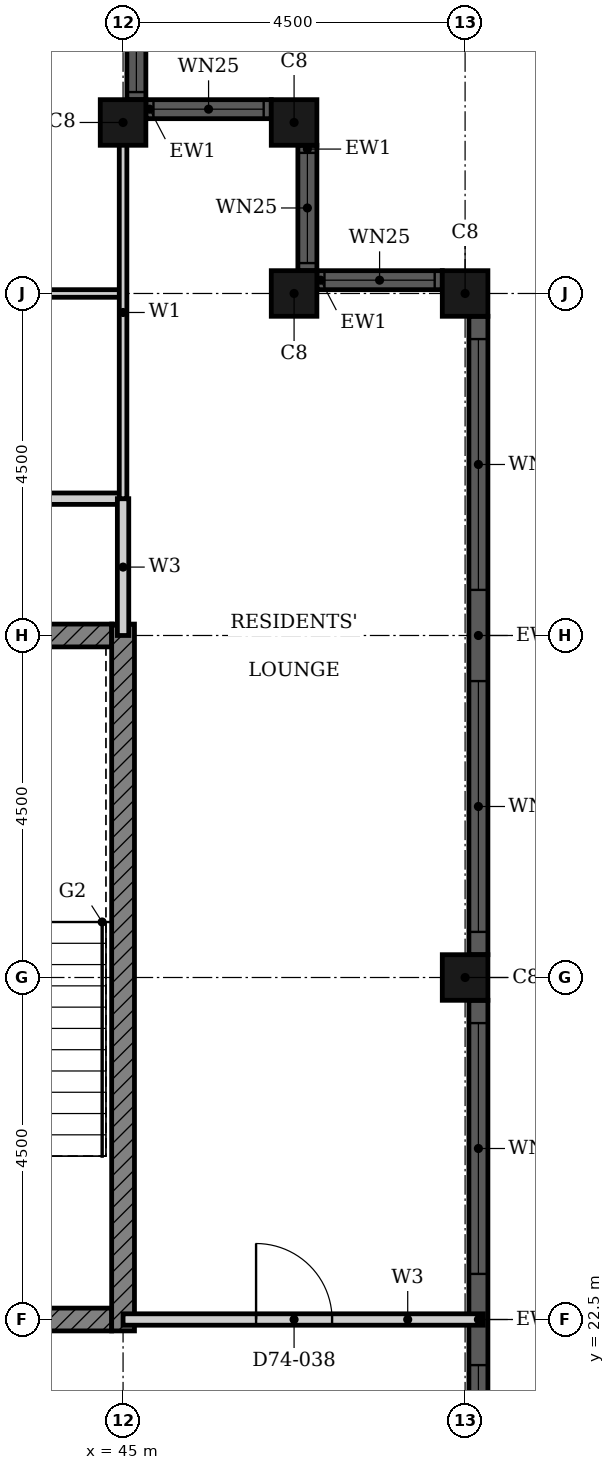
"""IFC4 building model, lengths in metres.
Left out: names, types, materials, properties, quantities, classifications, styles, units other than length and angle.
Written with IfcOpenShell. Run it as: python <this file> out.ifc"""

import sys

from ifc_helpers import new_model, si_unit, direction, frame, frame_2d, origin, origin_2d, place, context, subcontext, project, spatial, rectangle, hollow_rectangle, extrude, element, fill, save


model = new_model("IFC4")
c1 = context("Model", 3, precision=1e-05, world=origin(), true_north=direction((0.0, 1.0)))
c2 = subcontext(c1, "Body", "Model", "MODEL_VIEW")
j1 = project(units=[si_unit("LENGTHUNIT", "METRE"), si_unit("PLANEANGLEUNIT", "RADIAN")], contexts=[c1])
p1 = place(None, origin())
s1 = spatial("IfcSite", under=j1, at=p1, CompositionType="ELEMENT")
p2 = place(p1, origin())
s2 = spatial("IfcBuilding", under=s1, at=p2, CompositionType="ELEMENT")
p3 = place(p2, frame((0.0, 0.0, 290.8)))
s3 = spatial("IfcBuildingStorey", under=s2, at=p3, CompositionType="ELEMENT", Elevation=290.8)
for number, where, z_axis, x_axis in (
    (1, (49.5, 27.0, 0.0), (0.0, 0.0, 1.0), (1.0, 0.0, 0.0)),
    (2, (49.5, 36.0, 0.0), (0.0, 0.0, 1.0), (1.0, 0.0, 0.0)),
    (3, (47.25, 36.0, 0.0), (0.0, 0.0, 1.0), (1.0, 0.0, 0.0)),
    (4, (47.25, 38.25, 0.0), (0.0, 0.0, 1.0), (1.0, 0.0, 0.0)),
    (5, (45.0, 38.25, 0.0), (0.0, 0.0, 1.0), (1.0, 0.0, 0.0)),
):
    element("IfcColumn", number, at=place(p3, frame(where, z_axis=z_axis, x_axis=x_axis)), inside=s3, PredefinedType="COLUMN", context=c2, shape_type="SweptSolid", body=[
        extrude(hollow_rectangle(XDim=0.6, YDim=0.6, WallThickness=0.02, at=origin_2d()), origin(), (0.0, 0.0, 1.0), 3.7),
    ])
p4 = place(p3, frame((49.675, 18.3, 0.0), z_axis=(0.0, 0.0, 1.0), x_axis=(0.0, 1.0, 0.0)))
e6 = element("IfcWall", 6, at=p4, inside=s3, PredefinedType="SOLIDWALL", context=c2, shape_type="SweptSolid", body=[
    extrude(rectangle(XDim=8.4, YDim=0.25, at=frame_2d((4.2, 0.0))), origin(), (0.0, 0.0, 1.0), 3.7),
])
p5 = place(p4, frame((0.3, 0.0, 0.45)))
e7 = element("IfcOpeningElement", 7, at=p5, cuts=e6, PredefinedType="OPENING", context=c2, shape_type="SweptSolid", body=[
    extrude(rectangle(XDim=3.3, YDim=2.3, at=frame_2d((1.65, 1.15))), frame((0.0, 0.135, 0.0), z_axis=(0.0, -1.0, 0.0), x_axis=(1.0, 0.0, 0.0)), (0.0, 0.0, 1.0), 0.27),
])
p6 = place(p4, frame((4.8, 0.0, 0.45)))
e8 = element("IfcOpeningElement", 8, at=p6, cuts=e6, PredefinedType="OPENING", context=c2, shape_type="SweptSolid", body=[
    extrude(rectangle(XDim=3.3, YDim=2.3, at=frame_2d((1.65, 1.15))), frame((0.0, 0.135, 0.0), z_axis=(0.0, -1.0, 0.0), x_axis=(1.0, 0.0, 0.0)), (0.0, 0.0, 1.0), 0.27),
])
p7 = place(p3, frame((49.675, 27.3, 0.0), z_axis=(0.0, 0.0, 1.0), x_axis=(0.0, 1.0, 0.0)))
e9 = element("IfcWall", 9, at=p7, inside=s3, PredefinedType="SOLIDWALL", context=c2, shape_type="SweptSolid", body=[
    extrude(rectangle(XDim=8.4, YDim=0.25, at=frame_2d((4.2, 0.0))), origin(), (0.0, 0.0, 1.0), 3.7),
])
p8 = place(p7, frame((0.3, 0.0, 0.45)))
e10 = element("IfcOpeningElement", 10, at=p8, cuts=e9, PredefinedType="OPENING", context=c2, shape_type="SweptSolid", body=[
    extrude(rectangle(XDim=3.3, YDim=2.3, at=frame_2d((1.65, 1.15))), frame((0.0, 0.135, 0.0), z_axis=(0.0, -1.0, 0.0), x_axis=(1.0, 0.0, 0.0)), (0.0, 0.0, 1.0), 0.27),
])
p9 = place(p7, frame((4.8, 0.0, 0.45)))
e11 = element("IfcOpeningElement", 11, at=p9, cuts=e9, PredefinedType="OPENING", context=c2, shape_type="SweptSolid", body=[
    extrude(rectangle(XDim=3.3, YDim=2.3, at=frame_2d((1.65, 1.15))), frame((0.0, 0.135, 0.0), z_axis=(0.0, -1.0, 0.0), x_axis=(1.0, 0.0, 0.0)), (0.0, 0.0, 1.0), 0.27),
])
p10 = place(p3, frame((49.2, 36.175, 0.0), z_axis=(0.0, 0.0, 1.0), x_axis=(-1.0, 0.0, 0.0)))
e12 = element("IfcWall", 12, at=p10, inside=s3, PredefinedType="SOLIDWALL", context=c2, shape_type="SweptSolid", body=[
    extrude(rectangle(XDim=1.65, YDim=0.25, at=frame_2d((0.825, 0.0))), origin(), (0.0, 0.0, 1.0), 3.7),
])
p11 = place(p10, frame((0.1, 0.0, 0.9)))
e13 = element("IfcOpeningElement", 13, at=p11, cuts=e12, PredefinedType="OPENING", context=c2, shape_type="SweptSolid", body=[
    extrude(rectangle(XDim=1.45, YDim=1.85, at=frame_2d((0.725, 0.925))), frame((0.0, 0.135, 0.0), z_axis=(0.0, -1.0, 0.0), x_axis=(1.0, 0.0, 0.0)), (0.0, 0.0, 1.0), 0.27),
])
p12 = place(p3, frame((47.425, 36.3, 0.0), z_axis=(0.0, 0.0, 1.0), x_axis=(0.0, 1.0, 0.0)))
e14 = element("IfcWall", 14, at=p12, inside=s3, PredefinedType="SOLIDWALL", context=c2, shape_type="SweptSolid", body=[
    extrude(rectangle(XDim=1.65, YDim=0.25, at=frame_2d((0.825, 0.0))), origin(), (0.0, 0.0, 1.0), 3.7),
])
p13 = place(p12, frame((0.1, 0.0, 0.9)))
e15 = element("IfcOpeningElement", 15, at=p13, cuts=e14, PredefinedType="OPENING", context=c2, shape_type="SweptSolid", body=[
    extrude(rectangle(XDim=1.45, YDim=1.85, at=frame_2d((0.725, 0.925))), frame((0.0, 0.135, 0.0), z_axis=(0.0, -1.0, 0.0), x_axis=(1.0, 0.0, 0.0)), (0.0, 0.0, 1.0), 0.27),
])
p14 = place(p3, frame((46.95, 38.425, 0.0), z_axis=(0.0, 0.0, 1.0), x_axis=(-1.0, 0.0, 0.0)))
e16 = element("IfcWall", 16, at=p14, inside=s3, PredefinedType="SOLIDWALL", context=c2, shape_type="SweptSolid", body=[
    extrude(rectangle(XDim=1.65, YDim=0.25, at=frame_2d((0.825, 0.0))), origin(), (0.0, 0.0, 1.0), 3.7),
])
p15 = place(p14, frame((0.1, 0.0, 0.9)))
e17 = element("IfcOpeningElement", 17, at=p15, cuts=e16, PredefinedType="OPENING", context=c2, shape_type="SweptSolid", body=[
    extrude(rectangle(XDim=1.45, YDim=1.85, at=frame_2d((0.725, 0.925))), frame((0.0, 0.135, 0.0), z_axis=(0.0, -1.0, 0.0), x_axis=(1.0, 0.0, 0.0)), (0.0, 0.0, 1.0), 0.27),
])
p16 = place(p3, frame((45.175, 38.55, 0.0), z_axis=(0.0, 0.0, 1.0), x_axis=(0.0, 1.0, 0.0)))
e18 = element("IfcWall", 18, at=p16, inside=s3, PredefinedType="SOLIDWALL", context=c2, shape_type="SweptSolid", body=[
    extrude(rectangle(XDim=1.65, YDim=0.25, at=frame_2d((0.825, 0.0))), origin(), (0.0, 0.0, 1.0), 3.7),
])
p17 = place(p16, frame((0.1, 0.0, 0.9)))
e19 = element("IfcOpeningElement", 19, at=p17, cuts=e18, PredefinedType="OPENING", context=c2, shape_type="SweptSolid", body=[
    extrude(rectangle(XDim=1.45, YDim=1.85, at=frame_2d((0.725, 0.925))), frame((0.0, 0.135, 0.0), z_axis=(0.0, -1.0, 0.0), x_axis=(1.0, 0.0, 0.0)), (0.0, 0.0, 1.0), 0.27),
])
p18 = place(p3, frame((30.339, 22.5, 0.0), z_axis=(0.0, 0.0, 1.0), x_axis=(1.0, 0.0, 0.0)))
e20 = element("IfcWall", 20, at=p18, inside=s3, PredefinedType="SHEAR", context=c2, shape_type="SweptSolid", body=[
    extrude(rectangle(XDim=14.511, YDim=0.3, at=frame_2d((7.255, 0.0))), origin(), (0.0, 0.0, 1.0), 3.4),
])
p19 = place(p18, frame((7.975, 0.0, 0.0)))
e21 = element("IfcOpeningElement", 21, at=p19, cuts=e20, PredefinedType="OPENING", context=c2, shape_type="SweptSolid", body=[
    extrude(rectangle(XDim=1.8, YDim=2.1, at=frame_2d((0.9, 1.05))), frame((0.0, 0.16, 0.0), z_axis=(0.0, -1.0, 0.0), x_axis=(1.0, 0.0, 0.0)), (0.0, 0.0, 1.0), 0.32),
])
p20 = place(p3, frame((40.625, 31.5, 0.0), z_axis=(0.0, 0.0, 1.0), x_axis=(1.0, 0.0, 0.0)))
e22 = element("IfcWall", 22, at=p20, inside=s3, PredefinedType="SHEAR", context=c2, shape_type="SweptSolid", body=[
    extrude(rectangle(XDim=4.225, YDim=0.3, at=frame_2d((2.113, 0.0))), origin(), (0.0, 0.0, 1.0), 3.4),
])
p21 = place(p3, frame((45.0, 22.35, 0.0), z_axis=(0.0, 0.0, 1.0), x_axis=(0.0, 1.0, 0.0)))
e23 = element("IfcWall", 23, at=p21, inside=s3, PredefinedType="SHEAR", context=c2, shape_type="SweptSolid", body=[
    extrude(rectangle(XDim=9.3, YDim=0.3, at=frame_2d((4.65, 0.0))), origin(), (0.0, 0.0, 1.0), 3.4),
])
p22 = place(p3, frame((45.0, 22.5, 0.0), z_axis=(0.0, 0.0, 1.0), x_axis=(1.0, 0.0, 0.0)))
e24 = element("IfcWall", 24, at=p22, inside=s3, PredefinedType="PARTITIONING", context=c2, shape_type="SweptSolid", body=[
    extrude(rectangle(XDim=4.74, YDim=0.15, at=frame_2d((2.37, 0.0))), origin(), (0.0, 0.0, 1.0), 3.4),
])
p23 = place(p22, frame((1.75, 0.0, 0.0)))
e25 = element("IfcOpeningElement", 25, at=p23, cuts=e24, PredefinedType="OPENING", context=c2, shape_type="SweptSolid", body=[
    extrude(rectangle(XDim=1.0, YDim=2.1, at=frame_2d((0.5, 1.05))), frame((0.0, 0.085, 0.0), z_axis=(0.0, -1.0, 0.0), x_axis=(1.0, 0.0, 0.0)), (0.0, 0.0, 1.0), 0.17),
])
p24 = place(p3, frame((33.9, 33.3, 0.0), z_axis=(0.0, 0.0, 1.0), x_axis=(1.0, 0.0, 0.0)))
e26 = element("IfcWall", 26, at=p24, inside=s3, PredefinedType="PARTITIONING", context=c2, shape_type="SweptSolid", body=[
    extrude(rectangle(XDim=11.1, YDim=0.15, at=frame_2d((5.55, 0.0))), origin(), (0.0, 0.0, 1.0), 3.4),
])
p25 = place(p24, frame((1.6, 0.0, 0.0)))
e27 = element("IfcOpeningElement", 27, at=p25, cuts=e26, PredefinedType="OPENING", context=c2, shape_type="SweptSolid", body=[
    extrude(rectangle(XDim=1.0, YDim=2.2, at=frame_2d((0.5, 1.1))), frame((0.0, 0.085, 0.0), z_axis=(0.0, -1.0, 0.0), x_axis=(1.0, 0.0, 0.0)), (0.0, 0.0, 1.0), 0.17),
])
p26 = place(p3, frame((45.0, 31.5, 0.0), z_axis=(0.0, 0.0, 1.0), x_axis=(0.0, 1.0, 0.0)))
e28 = element("IfcWall", 28, at=p26, inside=s3, PredefinedType="PARTITIONING", context=c2, shape_type="SweptSolid", body=[
    extrude(rectangle(XDim=1.8, YDim=0.15, at=frame_2d((0.9, 0.0))), origin(), (0.0, 0.0, 1.0), 3.4),
])
p27 = place(p3, frame((38.1, 36.0, 0.0), z_axis=(0.0, 0.0, 1.0), x_axis=(1.0, 0.0, 0.0)))
e29 = element("IfcWall", 29, at=p27, inside=s3, PredefinedType="PARTITIONING", context=c2, shape_type="SweptSolid", body=[
    extrude(rectangle(XDim=6.9, YDim=0.1, at=frame_2d((3.45, 0.0))), origin(), (0.0, 0.0, 1.0), 3.4),
])
p28 = place(p27, frame((4.65, 0.0, 0.0)))
e30 = element("IfcOpeningElement", 30, at=p28, cuts=e29, PredefinedType="OPENING", context=c2, shape_type="SweptSolid", body=[
    extrude(rectangle(XDim=0.9, YDim=2.1, at=frame_2d((0.45, 1.05))), frame((0.0, 0.06, 0.0), z_axis=(0.0, -1.0, 0.0), x_axis=(1.0, 0.0, 0.0)), (0.0, 0.0, 1.0), 0.12),
])
p29 = place(p3, frame((45.0, 33.3, 0.0), z_axis=(0.0, 0.0, 1.0), x_axis=(0.0, 1.0, 0.0)))
e31 = element("IfcWall", 31, at=p29, inside=s3, PredefinedType="PARTITIONING", context=c2, shape_type="SweptSolid", body=[
    extrude(rectangle(XDim=4.9, YDim=0.1, at=frame_2d((2.45, 0.0))), origin(), (0.0, 0.0, 1.0), 3.4),
])
p30 = place(p5, origin())
e32 = element("IfcWindow", 32, at=p30, inside=s3, PartitioningType="SINGLE_PANEL", PredefinedType="WINDOW", context=c2, shape_type="SweptSolid", body=[
    extrude(rectangle(XDim=3.3, YDim=2.3, at=frame_2d((1.65, 1.15))), frame((0.0, 0.03, 0.0), z_axis=(0.0, -1.0, 0.0), x_axis=(1.0, 0.0, 0.0)), (0.0, 0.0, 1.0), 0.06),
])
fill(e7, e32)
p31 = place(p6, origin())
e33 = element("IfcWindow", 33, at=p31, inside=s3, PartitioningType="SINGLE_PANEL", PredefinedType="WINDOW", context=c2, shape_type="SweptSolid", body=[
    extrude(rectangle(XDim=3.3, YDim=2.3, at=frame_2d((1.65, 1.15))), frame((0.0, 0.03, 0.0), z_axis=(0.0, -1.0, 0.0), x_axis=(1.0, 0.0, 0.0)), (0.0, 0.0, 1.0), 0.06),
])
fill(e8, e33)
p32 = place(p8, origin())
e34 = element("IfcWindow", 34, at=p32, inside=s3, PartitioningType="SINGLE_PANEL", PredefinedType="WINDOW", context=c2, shape_type="SweptSolid", body=[
    extrude(rectangle(XDim=3.3, YDim=2.3, at=frame_2d((1.65, 1.15))), frame((0.0, 0.03, 0.0), z_axis=(0.0, -1.0, 0.0), x_axis=(1.0, 0.0, 0.0)), (0.0, 0.0, 1.0), 0.06),
])
fill(e10, e34)
p33 = place(p9, origin())
e35 = element("IfcWindow", 35, at=p33, inside=s3, PartitioningType="SINGLE_PANEL", PredefinedType="WINDOW", context=c2, shape_type="SweptSolid", body=[
    extrude(rectangle(XDim=3.3, YDim=2.3, at=frame_2d((1.65, 1.15))), frame((0.0, 0.03, 0.0), z_axis=(0.0, -1.0, 0.0), x_axis=(1.0, 0.0, 0.0)), (0.0, 0.0, 1.0), 0.06),
])
fill(e11, e35)
p34 = place(p11, origin())
e36 = element("IfcWindow", 36, at=p34, inside=s3, PartitioningType="SINGLE_PANEL", PredefinedType="WINDOW", context=c2, shape_type="SweptSolid", body=[
    extrude(rectangle(XDim=1.45, YDim=1.85, at=frame_2d((0.725, 0.925))), frame((0.0, 0.03, 0.0), z_axis=(0.0, -1.0, 0.0), x_axis=(1.0, 0.0, 0.0)), (0.0, 0.0, 1.0), 0.06),
])
fill(e13, e36)
p35 = place(p13, origin())
e37 = element("IfcWindow", 37, at=p35, inside=s3, PartitioningType="SINGLE_PANEL", PredefinedType="WINDOW", context=c2, shape_type="SweptSolid", body=[
    extrude(rectangle(XDim=1.45, YDim=1.85, at=frame_2d((0.725, 0.925))), frame((0.0, 0.03, 0.0), z_axis=(0.0, -1.0, 0.0), x_axis=(1.0, 0.0, 0.0)), (0.0, 0.0, 1.0), 0.06),
])
fill(e15, e37)
p36 = place(p15, origin())
e38 = element("IfcWindow", 38, at=p36, inside=s3, PartitioningType="SINGLE_PANEL", PredefinedType="WINDOW", context=c2, shape_type="SweptSolid", body=[
    extrude(rectangle(XDim=1.45, YDim=1.85, at=frame_2d((0.725, 0.925))), frame((0.0, 0.03, 0.0), z_axis=(0.0, -1.0, 0.0), x_axis=(1.0, 0.0, 0.0)), (0.0, 0.0, 1.0), 0.06),
])
fill(e17, e38)
p37 = place(p17, origin())
e39 = element("IfcWindow", 39, at=p37, inside=s3, PartitioningType="SINGLE_PANEL", PredefinedType="WINDOW", context=c2, shape_type="SweptSolid", body=[
    extrude(rectangle(XDim=1.45, YDim=1.85, at=frame_2d((0.725, 0.925))), frame((0.0, 0.03, 0.0), z_axis=(0.0, -1.0, 0.0), x_axis=(1.0, 0.0, 0.0)), (0.0, 0.0, 1.0), 0.06),
])
fill(e19, e39)
p38 = place(p23, origin())
e40 = element("IfcDoor", 40, at=p38, inside=s3, OperationType="SINGLE_SWING_LEFT", PredefinedType="DOOR", context=c2, shape_type="SweptSolid", body=[
    extrude(rectangle(XDim=1.0, YDim=2.1, at=frame_2d((0.5, 1.05))), frame((0.0, 0.025, 0.0), z_axis=(0.0, -1.0, 0.0), x_axis=(1.0, 0.0, 0.0)), (0.0, 0.0, 1.0), 0.05),
])
fill(e25, e40)
save(model, sys.argv[1])
